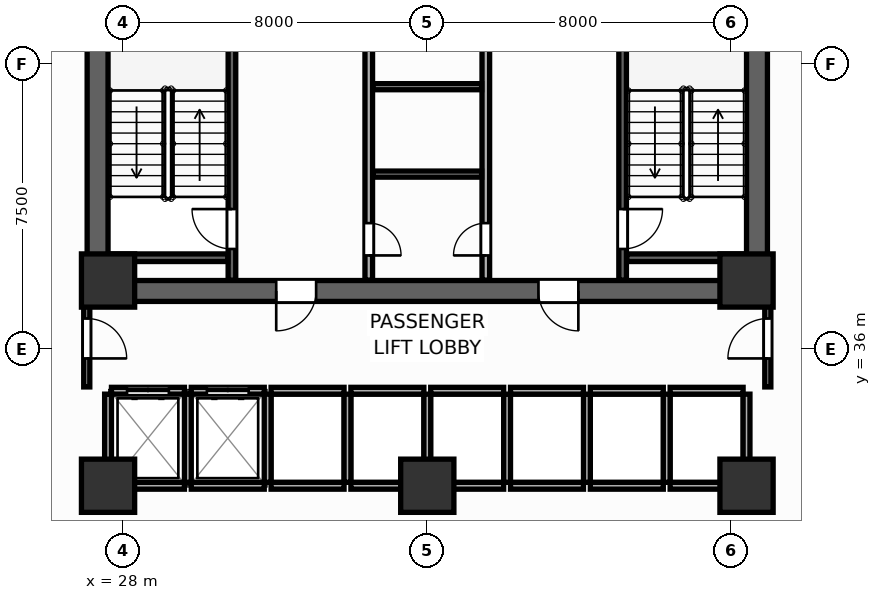
"""IFC4 building model, lengths in metres.
Left out: names, types, materials, properties, quantities, classifications, styles, units other than length and angle.
Written with IfcOpenShell. Run it as: python <this file> out.ifc"""

import sys

from ifc_helpers import new_model, si_unit, direction, frame, frame_2d, origin, origin_2d, place, context, subcontext, project, spatial, rectangle, extrude, source, transform, mapped, element, fill, save


model = new_model("IFC4")
c1 = context("Model", 3, precision=1e-05, world=origin(), true_north=direction((0.0, 1.0)))
c2 = subcontext(c1, "Body", "Model", "MODEL_VIEW")
j1 = project(units=[si_unit("LENGTHUNIT", "METRE"), si_unit("PLANEANGLEUNIT", "RADIAN")], contexts=[c1])
p1 = place(None, origin())
s1 = spatial("IfcSite", under=j1, at=p1, CompositionType="ELEMENT")
p2 = place(p1, origin())
s2 = spatial("IfcBuilding", under=s1, at=p2, CompositionType="ELEMENT")
p3 = place(p2, frame((0.0, 0.0, 55.2)))
s3 = spatial("IfcBuildingStorey", under=s2, at=p3, CompositionType="ELEMENT", Elevation=55.2)
p4 = place(p3, frame((27.05, 37.525, 0.0), z_axis=(0.0, 0.0, 1.0), x_axis=(1.0, 0.0, 0.0)))
e1 = element("IfcWall", 1, at=p4, inside=s3, PredefinedType="SHEAR", context=c2, shape_type="SweptSolid", body=[
    extrude(rectangle(XDim=17.9, YDim=0.55, at=frame_2d((8.95, 0.0))), origin(), (0.0, 0.0, 1.0), 3.9),
])
p5 = place(p4, frame((4.975, 0.0, 0.0)))
e2 = element("IfcOpeningElement", 2, at=p5, cuts=e1, PredefinedType="OPENING", context=c2, shape_type="SweptSolid", body=[
    extrude(rectangle(XDim=1.05, YDim=2.1, at=frame_2d((0.525, 1.05))), frame((0.0, 0.285, 0.0), z_axis=(0.0, -1.0, 0.0), x_axis=(1.0, 0.0, 0.0)), (0.0, 0.0, 1.0), 0.57),
])
p6 = place(p4, frame((11.875, 0.0, 0.0)))
e3 = element("IfcOpeningElement", 3, at=p6, cuts=e1, PredefinedType="OPENING", context=c2, shape_type="SweptSolid", body=[
    extrude(rectangle(XDim=1.05, YDim=2.1, at=frame_2d((0.525, 1.05))), frame((0.0, 0.285, 0.0), z_axis=(0.0, -1.0, 0.0), x_axis=(1.0, 0.0, 0.0)), (0.0, 0.0, 1.0), 0.57),
])
for number, where, z_axis, x_axis in (
    (4, (27.325, 37.8, 0.0), (0.0, 0.0, 1.0), (0.0, 1.0, 0.0)),
    (5, (44.675, 37.8, 0.0), (0.0, 0.0, 1.0), (0.0, 1.0, 0.0)),
):
    element("IfcWall", number, at=place(p3, frame(where, z_axis=z_axis, x_axis=x_axis)), inside=s3, PredefinedType="SHEAR", context=c2, shape_type="SweptSolid", body=[
        extrude(rectangle(XDim=9.0, YDim=0.55, at=frame_2d((4.5, 0.0))), origin(), (0.0, 0.0, 1.0), 3.9),
    ])
m1 = source(origin(), c2, "Body", "SweptSolid", [
    extrude(rectangle(XDim=1.4, YDim=1.4, at=origin_2d()), origin(), (0.0, 0.0, 1.0), 3.9),
])
for number, where, z_axis, x_axis in (
    (6, (27.6, 37.8, 0.0), (0.0, 0.0, 1.0), (1.0, 0.0, 0.0)),
    (7, (44.4, 37.8, 0.0), (0.0, 0.0, 1.0), (1.0, 0.0, 0.0)),
    (8, (27.6, 32.4, 0.0), (0.0, 0.0, 1.0), (1.0, 0.0, 0.0)),
    (9, (44.4, 32.4, 0.0), (0.0, 0.0, 1.0), (1.0, 0.0, 0.0)),
    (10, (36.0, 32.4, 0.0), (0.0, 0.0, 1.0), (1.0, 0.0, 0.0)),
):
    element("IfcColumn", number, at=place(p3, frame(where, z_axis=z_axis, x_axis=x_axis)), inside=s3, PredefinedType="COLUMN", context=c2, shape_type="MappedRepresentation", body=[
        mapped(m1, transform((0.0, 0.0, 0.0), scale=1.0)),
    ])
p7 = place(p3, frame((30.86, 37.81, 0.0), z_axis=(0.0, 0.0, 1.0), x_axis=(0.0, 1.0, 0.0)))
e11 = element("IfcWall", 11, at=p7, inside=s3, PredefinedType="SHEAR", context=c2, shape_type="SweptSolid", body=[
    extrude(rectangle(XDim=8.98, YDim=0.2, at=frame_2d((4.49, 0.0))), origin(), (0.0, 0.0, 1.0), 3.9),
])
p8 = place(p7, frame((0.82, 0.0, 0.0)))
e12 = element("IfcOpeningElement", 12, at=p8, cuts=e11, PredefinedType="OPENING", context=c2, shape_type="SweptSolid", body=[
    extrude(rectangle(XDim=1.05, YDim=2.1, at=frame_2d((0.525, 1.05))), frame((0.0, 0.11, 0.0), z_axis=(0.0, -1.0, 0.0), x_axis=(1.0, 0.0, 0.0)), (0.0, 0.0, 1.0), 0.22),
])
p9 = place(p3, frame((27.61, 38.4, 0.0), z_axis=(0.0, 0.0, 1.0), x_axis=(1.0, 0.0, 0.0)))
e13 = element("IfcWall", 13, at=p9, inside=s3, PredefinedType="SHEAR", context=c2, shape_type="SweptSolid", body=[
    extrude(rectangle(XDim=3.14, YDim=0.2, at=frame_2d((1.57, 0.0))), origin(), (0.0, 0.0, 1.0), 3.9),
])
p10 = place(p3, frame((41.14, 37.81, 0.0), z_axis=(0.0, 0.0, 1.0), x_axis=(0.0, 1.0, 0.0)))
e14 = element("IfcWall", 14, at=p10, inside=s3, PredefinedType="SHEAR", context=c2, shape_type="SweptSolid", body=[
    extrude(rectangle(XDim=8.98, YDim=0.2, at=frame_2d((4.49, 0.0))), origin(), (0.0, 0.0, 1.0), 3.9),
])
p11 = place(p10, frame((0.82, 0.0, 0.0)))
e15 = element("IfcOpeningElement", 15, at=p11, cuts=e14, PredefinedType="OPENING", context=c2, shape_type="SweptSolid", body=[
    extrude(rectangle(XDim=1.05, YDim=2.1, at=frame_2d((0.525, 1.05))), frame((0.0, 0.11, 0.0), z_axis=(0.0, -1.0, 0.0), x_axis=(1.0, 0.0, 0.0)), (0.0, 0.0, 1.0), 0.22),
])
p12 = place(p3, frame((41.25, 38.4, 0.0), z_axis=(0.0, 0.0, 1.0), x_axis=(1.0, 0.0, 0.0)))
e16 = element("IfcWall", 16, at=p12, inside=s3, PredefinedType="SHEAR", context=c2, shape_type="SweptSolid", body=[
    extrude(rectangle(XDim=3.14, YDim=0.2, at=frame_2d((1.57, 0.0))), origin(), (0.0, 0.0, 1.0), 3.9),
])
p13 = place(p3, frame((34.46, 37.81, 0.0), z_axis=(0.0, 0.0, 1.0), x_axis=(0.0, 1.0, 0.0)))
e17 = element("IfcWall", 17, at=p13, inside=s3, PredefinedType="PARTITIONING", context=c2, shape_type="SweptSolid", body=[
    extrude(rectangle(XDim=8.98, YDim=0.2, at=frame_2d((4.49, 0.0))), origin(), (0.0, 0.0, 1.0), 3.56),
])
p14 = place(p13, frame((0.65, 0.0, 0.0)))
e18 = element("IfcOpeningElement", 18, at=p14, cuts=e17, PredefinedType="OPENING", context=c2, shape_type="SweptSolid", body=[
    extrude(rectangle(XDim=0.85, YDim=2.05, at=frame_2d((0.425, 1.025))), frame((0.0, 0.11, 0.0), z_axis=(0.0, -1.0, 0.0), x_axis=(1.0, 0.0, 0.0)), (0.0, 0.0, 1.0), 0.22),
])
p15 = place(p3, frame((37.54, 37.81, 0.0), z_axis=(0.0, 0.0, 1.0), x_axis=(0.0, 1.0, 0.0)))
e19 = element("IfcWall", 19, at=p15, inside=s3, PredefinedType="PARTITIONING", context=c2, shape_type="SweptSolid", body=[
    extrude(rectangle(XDim=8.98, YDim=0.2, at=frame_2d((4.49, 0.0))), origin(), (0.0, 0.0, 1.0), 3.56),
])
p16 = place(p15, frame((0.65, 0.0, 0.0)))
e20 = element("IfcOpeningElement", 20, at=p16, cuts=e19, PredefinedType="OPENING", context=c2, shape_type="SweptSolid", body=[
    extrude(rectangle(XDim=0.85, YDim=2.05, at=frame_2d((0.425, 1.025))), frame((0.0, 0.11, 0.0), z_axis=(0.0, -1.0, 0.0), x_axis=(1.0, 0.0, 0.0)), (0.0, 0.0, 1.0), 0.22),
])
for number, where, z_axis, x_axis in (
    (21, (34.57, 40.6, 0.0), (0.0, 0.0, 1.0), (1.0, 0.0, 0.0)),
    (22, (34.57, 42.9, 0.0), (0.0, 0.0, 1.0), (1.0, 0.0, 0.0)),
):
    element("IfcWall", number, at=place(p3, frame(where, z_axis=z_axis, x_axis=x_axis)), inside=s3, PredefinedType="PARTITIONING", context=c2, shape_type="SweptSolid", body=[
        extrude(rectangle(XDim=2.86, YDim=0.16, at=frame_2d((1.43, 0.0))), origin(), (0.0, 0.0, 1.0), 3.56),
    ])
p17 = place(p3, frame((27.69, 34.9, 0.0), z_axis=(0.0, 0.0, 1.0), x_axis=(1.0, 0.0, 0.0)))
e23 = element("IfcWall", 23, at=p17, inside=s3, PredefinedType="PARTITIONING", context=c2, shape_type="SweptSolid", body=[
    extrude(rectangle(XDim=1.92, YDim=0.18, at=frame_2d((0.96, 0.0))), origin(), (0.0, 0.0, 1.0), 3.56),
])
p18 = place(p17, frame((0.41, 0.0, 0.0)))
e24 = element("IfcOpeningElement", 24, at=p18, cuts=e23, PredefinedType="OPENING", context=c2, shape_type="SweptSolid", body=[
    extrude(rectangle(XDim=1.1, YDim=2.1, at=frame_2d((0.55, 1.05))), frame((0.0, 0.1, 0.0), z_axis=(0.0, -1.0, 0.0), x_axis=(1.0, 0.0, 0.0)), (0.0, 0.0, 1.0), 0.2),
])
p19 = place(p3, frame((27.69, 32.4, 0.0), z_axis=(0.0, 0.0, 1.0), x_axis=(1.0, 0.0, 0.0)))
e25 = element("IfcWall", 25, at=p19, inside=s3, PredefinedType="PARTITIONING", context=c2, shape_type="SweptSolid", body=[
    extrude(rectangle(XDim=1.92, YDim=0.18, at=frame_2d((0.96, 0.0))), origin(), (0.0, 0.0, 1.0), 3.06),
])
p20 = place(p3, frame((27.6, 32.49, 0.0), z_axis=(0.0, 0.0, 1.0), x_axis=(0.0, 1.0, 0.0)))
e26 = element("IfcWall", 26, at=p20, inside=s3, PredefinedType="PARTITIONING", context=c2, shape_type="SweptSolid", body=[
    extrude(rectangle(XDim=2.32, YDim=0.18, at=frame_2d((1.16, 0.0))), origin(), (0.0, 0.0, 1.0), 3.56),
])
p21 = place(p3, frame((29.79, 34.9, 0.0), z_axis=(0.0, 0.0, 1.0), x_axis=(1.0, 0.0, 0.0)))
e27 = element("IfcWall", 27, at=p21, inside=s3, PredefinedType="PARTITIONING", context=c2, shape_type="SweptSolid", body=[
    extrude(rectangle(XDim=1.92, YDim=0.18, at=frame_2d((0.96, 0.0))), origin(), (0.0, 0.0, 1.0), 3.56),
])
p22 = place(p21, frame((0.41, 0.0, 0.0)))
e28 = element("IfcOpeningElement", 28, at=p22, cuts=e27, PredefinedType="OPENING", context=c2, shape_type="SweptSolid", body=[
    extrude(rectangle(XDim=1.1, YDim=2.1, at=frame_2d((0.55, 1.05))), frame((0.0, 0.1, 0.0), z_axis=(0.0, -1.0, 0.0), x_axis=(1.0, 0.0, 0.0)), (0.0, 0.0, 1.0), 0.2),
])
p23 = place(p3, frame((29.79, 32.4, 0.0), z_axis=(0.0, 0.0, 1.0), x_axis=(1.0, 0.0, 0.0)))
e29 = element("IfcWall", 29, at=p23, inside=s3, PredefinedType="PARTITIONING", context=c2, shape_type="SweptSolid", body=[
    extrude(rectangle(XDim=1.92, YDim=0.18, at=frame_2d((0.96, 0.0))), origin(), (0.0, 0.0, 1.0), 3.06),
])
p24 = place(p3, frame((29.7, 32.49, 0.0), z_axis=(0.0, 0.0, 1.0), x_axis=(0.0, 1.0, 0.0)))
e30 = element("IfcWall", 30, at=p24, inside=s3, PredefinedType="PARTITIONING", context=c2, shape_type="SweptSolid", body=[
    extrude(rectangle(XDim=2.32, YDim=0.18, at=frame_2d((1.16, 0.0))), origin(), (0.0, 0.0, 1.0), 3.56),
])
p25 = place(p3, frame((31.89, 34.9, 0.0), z_axis=(0.0, 0.0, 1.0), x_axis=(1.0, 0.0, 0.0)))
e31 = element("IfcWall", 31, at=p25, inside=s3, PredefinedType="PARTITIONING", context=c2, shape_type="SweptSolid", body=[
    extrude(rectangle(XDim=1.92, YDim=0.18, at=frame_2d((0.96, 0.0))), origin(), (0.0, 0.0, 1.0), 3.56),
])
p26 = place(p3, frame((31.89, 32.4, 0.0), z_axis=(0.0, 0.0, 1.0), x_axis=(1.0, 0.0, 0.0)))
e32 = element("IfcWall", 32, at=p26, inside=s3, PredefinedType="PARTITIONING", context=c2, shape_type="SweptSolid", body=[
    extrude(rectangle(XDim=1.92, YDim=0.18, at=frame_2d((0.96, 0.0))), origin(), (0.0, 0.0, 1.0), 3.06),
])
p27 = place(p3, frame((31.8, 32.49, 0.0), z_axis=(0.0, 0.0, 1.0), x_axis=(0.0, 1.0, 0.0)))
e33 = element("IfcWall", 33, at=p27, inside=s3, PredefinedType="PARTITIONING", context=c2, shape_type="SweptSolid", body=[
    extrude(rectangle(XDim=2.32, YDim=0.18, at=frame_2d((1.16, 0.0))), origin(), (0.0, 0.0, 1.0), 3.56),
])
p28 = place(p3, frame((33.99, 34.9, 0.0), z_axis=(0.0, 0.0, 1.0), x_axis=(1.0, 0.0, 0.0)))
e34 = element("IfcWall", 34, at=p28, inside=s3, PredefinedType="PARTITIONING", context=c2, shape_type="SweptSolid", body=[
    extrude(rectangle(XDim=1.92, YDim=0.18, at=frame_2d((0.96, 0.0))), origin(), (0.0, 0.0, 1.0), 3.56),
])
p29 = place(p3, frame((33.99, 32.4, 0.0), z_axis=(0.0, 0.0, 1.0), x_axis=(1.0, 0.0, 0.0)))
e35 = element("IfcWall", 35, at=p29, inside=s3, PredefinedType="PARTITIONING", context=c2, shape_type="SweptSolid", body=[
    extrude(rectangle(XDim=1.92, YDim=0.18, at=frame_2d((0.96, 0.0))), origin(), (0.0, 0.0, 1.0), 3.06),
])
p30 = place(p3, frame((33.9, 32.49, 0.0), z_axis=(0.0, 0.0, 1.0), x_axis=(0.0, 1.0, 0.0)))
e36 = element("IfcWall", 36, at=p30, inside=s3, PredefinedType="PARTITIONING", context=c2, shape_type="SweptSolid", body=[
    extrude(rectangle(XDim=2.32, YDim=0.18, at=frame_2d((1.16, 0.0))), origin(), (0.0, 0.0, 1.0), 3.56),
])
p31 = place(p3, frame((36.09, 34.9, 0.0), z_axis=(0.0, 0.0, 1.0), x_axis=(1.0, 0.0, 0.0)))
e37 = element("IfcWall", 37, at=p31, inside=s3, PredefinedType="PARTITIONING", context=c2, shape_type="SweptSolid", body=[
    extrude(rectangle(XDim=1.92, YDim=0.18, at=frame_2d((0.96, 0.0))), origin(), (0.0, 0.0, 1.0), 3.56),
])
p32 = place(p3, frame((36.09, 32.4, 0.0), z_axis=(0.0, 0.0, 1.0), x_axis=(1.0, 0.0, 0.0)))
e38 = element("IfcWall", 38, at=p32, inside=s3, PredefinedType="PARTITIONING", context=c2, shape_type="SweptSolid", body=[
    extrude(rectangle(XDim=1.92, YDim=0.18, at=frame_2d((0.96, 0.0))), origin(), (0.0, 0.0, 1.0), 3.06),
])
p33 = place(p3, frame((36.0, 32.49, 0.0), z_axis=(0.0, 0.0, 1.0), x_axis=(0.0, 1.0, 0.0)))
e39 = element("IfcWall", 39, at=p33, inside=s3, PredefinedType="PARTITIONING", context=c2, shape_type="SweptSolid", body=[
    extrude(rectangle(XDim=2.32, YDim=0.18, at=frame_2d((1.16, 0.0))), origin(), (0.0, 0.0, 1.0), 3.56),
])
p34 = place(p3, frame((38.19, 34.9, 0.0), z_axis=(0.0, 0.0, 1.0), x_axis=(1.0, 0.0, 0.0)))
e40 = element("IfcWall", 40, at=p34, inside=s3, PredefinedType="PARTITIONING", context=c2, shape_type="SweptSolid", body=[
    extrude(rectangle(XDim=1.92, YDim=0.18, at=frame_2d((0.96, 0.0))), origin(), (0.0, 0.0, 1.0), 3.56),
])
p35 = place(p3, frame((38.19, 32.4, 0.0), z_axis=(0.0, 0.0, 1.0), x_axis=(1.0, 0.0, 0.0)))
e41 = element("IfcWall", 41, at=p35, inside=s3, PredefinedType="PARTITIONING", context=c2, shape_type="SweptSolid", body=[
    extrude(rectangle(XDim=1.92, YDim=0.18, at=frame_2d((0.96, 0.0))), origin(), (0.0, 0.0, 1.0), 3.06),
])
p36 = place(p3, frame((38.1, 32.49, 0.0), z_axis=(0.0, 0.0, 1.0), x_axis=(0.0, 1.0, 0.0)))
e42 = element("IfcWall", 42, at=p36, inside=s3, PredefinedType="PARTITIONING", context=c2, shape_type="SweptSolid", body=[
    extrude(rectangle(XDim=2.32, YDim=0.18, at=frame_2d((1.16, 0.0))), origin(), (0.0, 0.0, 1.0), 3.56),
])
p37 = place(p3, frame((40.29, 34.9, 0.0), z_axis=(0.0, 0.0, 1.0), x_axis=(1.0, 0.0, 0.0)))
e43 = element("IfcWall", 43, at=p37, inside=s3, PredefinedType="PARTITIONING", context=c2, shape_type="SweptSolid", body=[
    extrude(rectangle(XDim=1.92, YDim=0.18, at=frame_2d((0.96, 0.0))), origin(), (0.0, 0.0, 1.0), 3.56),
])
p38 = place(p3, frame((40.29, 32.4, 0.0), z_axis=(0.0, 0.0, 1.0), x_axis=(1.0, 0.0, 0.0)))
e44 = element("IfcWall", 44, at=p38, inside=s3, PredefinedType="PARTITIONING", context=c2, shape_type="SweptSolid", body=[
    extrude(rectangle(XDim=1.92, YDim=0.18, at=frame_2d((0.96, 0.0))), origin(), (0.0, 0.0, 1.0), 3.06),
])
p39 = place(p3, frame((40.2, 32.49, 0.0), z_axis=(0.0, 0.0, 1.0), x_axis=(0.0, 1.0, 0.0)))
e45 = element("IfcWall", 45, at=p39, inside=s3, PredefinedType="PARTITIONING", context=c2, shape_type="SweptSolid", body=[
    extrude(rectangle(XDim=2.32, YDim=0.18, at=frame_2d((1.16, 0.0))), origin(), (0.0, 0.0, 1.0), 3.56),
])
p40 = place(p3, frame((42.39, 34.9, 0.0), z_axis=(0.0, 0.0, 1.0), x_axis=(1.0, 0.0, 0.0)))
e46 = element("IfcWall", 46, at=p40, inside=s3, PredefinedType="PARTITIONING", context=c2, shape_type="SweptSolid", body=[
    extrude(rectangle(XDim=1.92, YDim=0.18, at=frame_2d((0.96, 0.0))), origin(), (0.0, 0.0, 1.0), 3.56),
])
p41 = place(p3, frame((42.39, 32.4, 0.0), z_axis=(0.0, 0.0, 1.0), x_axis=(1.0, 0.0, 0.0)))
e47 = element("IfcWall", 47, at=p41, inside=s3, PredefinedType="PARTITIONING", context=c2, shape_type="SweptSolid", body=[
    extrude(rectangle(XDim=1.92, YDim=0.18, at=frame_2d((0.96, 0.0))), origin(), (0.0, 0.0, 1.0), 3.06),
])
for number, where, z_axis, x_axis in (
    (48, (42.3, 32.49, 0.0), (0.0, 0.0, 1.0), (0.0, 1.0, 0.0)),
    (49, (44.4, 32.49, 0.0), (0.0, 0.0, 1.0), (0.0, 1.0, 0.0)),
):
    element("IfcWall", number, at=place(p3, frame(where, z_axis=z_axis, x_axis=x_axis)), inside=s3, PredefinedType="PARTITIONING", context=c2, shape_type="SweptSolid", body=[
        extrude(rectangle(XDim=2.32, YDim=0.18, at=frame_2d((1.16, 0.0))), origin(), (0.0, 0.0, 1.0), 3.56),
    ])
p42 = place(p3, frame((27.04, 35.0, 0.0), z_axis=(0.0, 0.0, 1.0), x_axis=(0.0, 1.0, 0.0)))
e50 = element("IfcWall", 50, at=p42, inside=s3, PredefinedType="PARTITIONING", context=c2, shape_type="SweptSolid", body=[
    extrude(rectangle(XDim=2.65, YDim=0.16, at=frame_2d((1.325, 0.0))), origin(), (0.0, 0.0, 1.0), 3.56),
])
p43 = place(p42, frame((0.75, 0.0, 0.0)))
e51 = element("IfcOpeningElement", 51, at=p43, cuts=e50, PredefinedType="OPENING", context=c2, shape_type="SweptSolid", body=[
    extrude(rectangle(XDim=1.05, YDim=2.1, at=frame_2d((0.525, 1.05))), frame((0.0, 0.09, 0.0), z_axis=(0.0, -1.0, 0.0), x_axis=(1.0, 0.0, 0.0)), (0.0, 0.0, 1.0), 0.18),
])
p44 = place(p3, frame((44.96, 35.0, 0.0), z_axis=(0.0, 0.0, 1.0), x_axis=(0.0, 1.0, 0.0)))
e52 = element("IfcWall", 52, at=p44, inside=s3, PredefinedType="PARTITIONING", context=c2, shape_type="SweptSolid", body=[
    extrude(rectangle(XDim=2.65, YDim=0.16, at=frame_2d((1.325, 0.0))), origin(), (0.0, 0.0, 1.0), 3.56),
])
p45 = place(p44, frame((0.75, 0.0, 0.0)))
e53 = element("IfcOpeningElement", 53, at=p45, cuts=e52, PredefinedType="OPENING", context=c2, shape_type="SweptSolid", body=[
    extrude(rectangle(XDim=1.05, YDim=2.1, at=frame_2d((0.525, 1.05))), frame((0.0, 0.09, 0.0), z_axis=(0.0, -1.0, 0.0), x_axis=(1.0, 0.0, 0.0)), (0.0, 0.0, 1.0), 0.18),
])
p46 = place(p8, origin())
e54 = element("IfcDoor", 54, at=p46, inside=s3, OperationType="SINGLE_SWING_RIGHT", PredefinedType="DOOR", context=c2, shape_type="SweptSolid", body=[
    extrude(rectangle(XDim=1.05, YDim=2.1, at=frame_2d((0.525, 1.05))), frame((0.0, 0.025, 0.0), z_axis=(0.0, -1.0, 0.0), x_axis=(1.0, 0.0, 0.0)), (0.0, 0.0, 1.0), 0.05),
])
fill(e12, e54)
p47 = place(p11, frame((1.05, 0.0, 0.0), z_axis=(0.0, 0.0, 1.0), x_axis=(-1.0, 0.0, 0.0)))
e55 = element("IfcDoor", 55, at=p47, inside=s3, OperationType="SINGLE_SWING_LEFT", PredefinedType="DOOR", context=c2, shape_type="SweptSolid", body=[
    extrude(rectangle(XDim=1.05, YDim=2.1, at=frame_2d((0.525, 1.05))), frame((0.0, 0.025, 0.0), z_axis=(0.0, -1.0, 0.0), x_axis=(1.0, 0.0, 0.0)), (0.0, 0.0, 1.0), 0.05),
])
fill(e15, e55)
p48 = place(p14, frame((0.85, 0.0, 0.0), z_axis=(0.0, 0.0, 1.0), x_axis=(-1.0, 0.0, 0.0)))
e56 = element("IfcDoor", 56, at=p48, inside=s3, OperationType="SINGLE_SWING_RIGHT", PredefinedType="DOOR", context=c2, shape_type="SweptSolid", body=[
    extrude(rectangle(XDim=0.85, YDim=2.05, at=frame_2d((0.425, 1.025))), frame((0.0, 0.025, 0.0), z_axis=(0.0, -1.0, 0.0), x_axis=(1.0, 0.0, 0.0)), (0.0, 0.0, 1.0), 0.05),
])
fill(e18, e56)
p49 = place(p16, origin())
e57 = element("IfcDoor", 57, at=p49, inside=s3, OperationType="SINGLE_SWING_LEFT", PredefinedType="DOOR", context=c2, shape_type="SweptSolid", body=[
    extrude(rectangle(XDim=0.85, YDim=2.05, at=frame_2d((0.425, 1.025))), frame((0.0, 0.025, 0.0), z_axis=(0.0, -1.0, 0.0), x_axis=(1.0, 0.0, 0.0)), (0.0, 0.0, 1.0), 0.05),
])
fill(e20, e57)
p50 = place(p18, origin())
e58 = element("IfcDoor", 58, at=p50, inside=s3, OperationType="DOUBLE_DOOR_SLIDING", PredefinedType="DOOR", context=c2, shape_type="SweptSolid", body=[
    extrude(rectangle(XDim=1.1, YDim=2.1, at=frame_2d((0.55, 1.05))), frame((0.0, 0.025, 0.0), z_axis=(0.0, -1.0, 0.0), x_axis=(1.0, 0.0, 0.0)), (0.0, 0.0, 1.0), 0.05),
])
fill(e24, e58)
p51 = place(p22, origin())
e59 = element("IfcDoor", 59, at=p51, inside=s3, OperationType="DOUBLE_DOOR_SLIDING", PredefinedType="DOOR", context=c2, shape_type="SweptSolid", body=[
    extrude(rectangle(XDim=1.1, YDim=2.1, at=frame_2d((0.55, 1.05))), frame((0.0, 0.025, 0.0), z_axis=(0.0, -1.0, 0.0), x_axis=(1.0, 0.0, 0.0)), (0.0, 0.0, 1.0), 0.05),
])
fill(e28, e59)
p52 = place(p43, frame((1.05, 0.0, 0.0), z_axis=(0.0, 0.0, 1.0), x_axis=(-1.0, 0.0, 0.0)))
e60 = element("IfcDoor", 60, at=p52, inside=s3, OperationType="SINGLE_SWING_RIGHT", PredefinedType="DOOR", context=c2, shape_type="SweptSolid", body=[
    extrude(rectangle(XDim=1.05, YDim=2.1, at=frame_2d((0.525, 1.05))), frame((0.0, 0.025, 0.0), z_axis=(0.0, -1.0, 0.0), x_axis=(1.0, 0.0, 0.0)), (0.0, 0.0, 1.0), 0.05),
])
fill(e51, e60)
p53 = place(p45, origin())
e61 = element("IfcDoor", 61, at=p53, inside=s3, OperationType="SINGLE_SWING_LEFT", PredefinedType="DOOR", context=c2, shape_type="SweptSolid", body=[
    extrude(rectangle(XDim=1.05, YDim=2.1, at=frame_2d((0.525, 1.05))), frame((0.0, 0.025, 0.0), z_axis=(0.0, -1.0, 0.0), x_axis=(1.0, 0.0, 0.0)), (0.0, 0.0, 1.0), 0.05),
])
fill(e53, e61)
p54 = place(p5, frame((1.05, 0.0, 0.0), z_axis=(0.0, 0.0, 1.0), x_axis=(-1.0, 0.0, 0.0)))
e62 = element("IfcDoor", 62, at=p54, inside=s3, OperationType="SINGLE_SWING_RIGHT", PredefinedType="DOOR", context=c2, shape_type="SweptSolid", body=[
    extrude(rectangle(XDim=1.05, YDim=2.1, at=frame_2d((0.525, 1.05))), frame((0.0, 0.025, 0.0), z_axis=(0.0, -1.0, 0.0), x_axis=(1.0, 0.0, 0.0)), (0.0, 0.0, 1.0), 0.05),
])
fill(e2, e62)
p55 = place(p6, frame((1.05, 0.0, 0.0), z_axis=(0.0, 0.0, 1.0), x_axis=(-1.0, 0.0, 0.0)))
e63 = element("IfcDoor", 63, at=p55, inside=s3, OperationType="SINGLE_SWING_LEFT", PredefinedType="DOOR", context=c2, shape_type="SweptSolid", body=[
    extrude(rectangle(XDim=1.05, YDim=2.1, at=frame_2d((0.525, 1.05))), frame((0.0, 0.025, 0.0), z_axis=(0.0, -1.0, 0.0), x_axis=(1.0, 0.0, 0.0)), (0.0, 0.0, 1.0), 0.05),
])
fill(e3, e63)
save(model, sys.argv[1])
